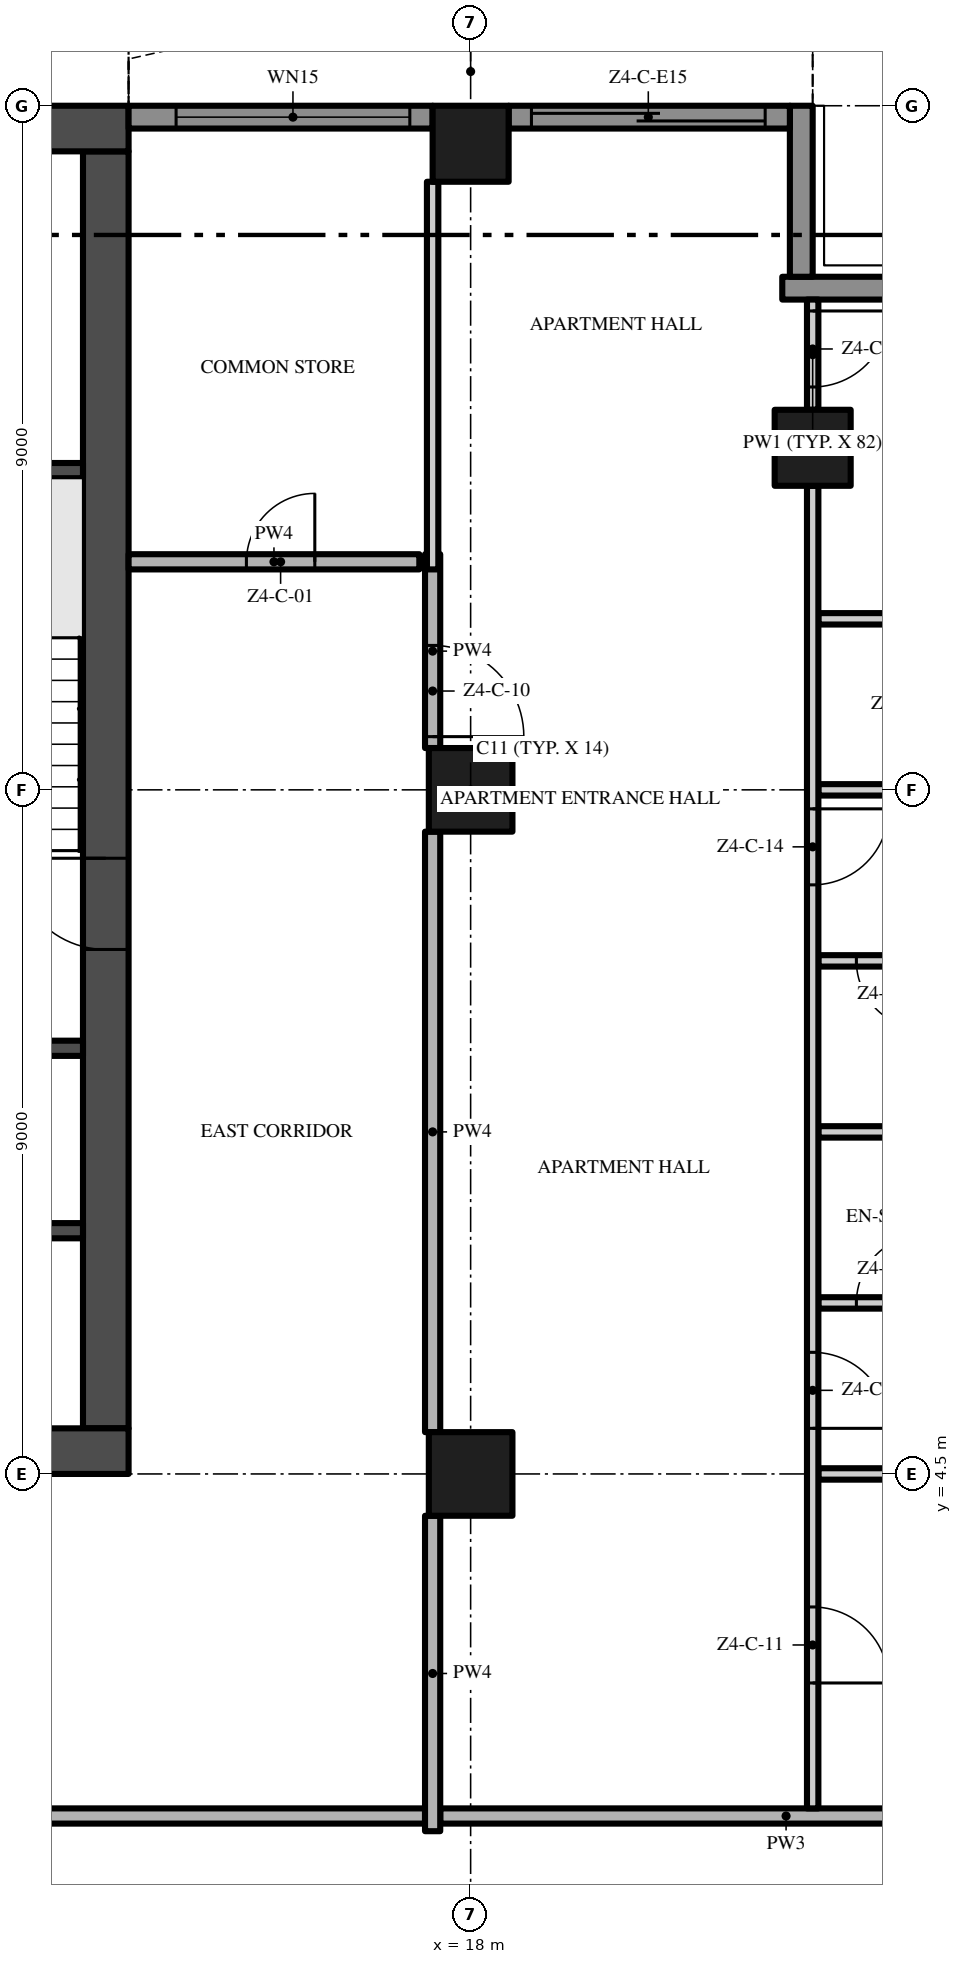
"""IFC4 building model, lengths in metres.
Left out: names, types, materials, properties, quantities, classifications, styles, units other than length and angle.
Written with IfcOpenShell. Run it as: python <this file> out.ifc"""

import sys

from ifc_helpers import new_model, si_unit, direction, frame, frame_2d, origin, origin_2d, place, context, subcontext, project, spatial, polyline, rectangle, outline, extrude, element, fill, save


model = new_model("IFC4")
c1 = context("Model", 3, precision=1e-05, world=origin(), true_north=direction((0.0, 1.0)))
c2 = subcontext(c1, "Body", "Model", "MODEL_VIEW")
j1 = project(units=[si_unit("LENGTHUNIT", "METRE"), si_unit("PLANEANGLEUNIT", "RADIAN")], contexts=[c1])
p1 = place(None, origin())
s1 = spatial("IfcSite", under=j1, at=p1, CompositionType="ELEMENT")
p2 = place(p1, origin())
s2 = spatial("IfcBuilding", under=s1, at=p2, CompositionType="ELEMENT")
p3 = place(p2, frame((0.0, 0.0, 214.8)))
s3 = spatial("IfcBuildingStorey", under=s2, at=p3, CompositionType="ELEMENT", Elevation=214.8)
p4 = place(p3, frame((-13.5, 4.8, -0.3), z_axis=(0.0, 0.0, 1.0), x_axis=(1.0, 0.0, 0.0)))
e1 = element("IfcWall", 1, at=p4, inside=s3, PredefinedType="SHEAR", context=c2, shape_type="SweptSolid", body=[
    extrude(rectangle(XDim=27.0, YDim=0.6, at=frame_2d((13.5, 0.0))), origin(), (0.0, 0.0, 1.0), 3.8),
])
p5 = place(p4, frame((12.0, 0.0, 0.3)))
e2 = element("IfcOpeningElement", 2, at=p5, cuts=e1, PredefinedType="OPENING", context=c2, shape_type="SweptSolid", body=[
    extrude(rectangle(XDim=3.0, YDim=2.4, at=frame_2d((1.5, 1.2))), frame((0.0, 0.31, 0.0), z_axis=(0.0, -1.0, 0.0), x_axis=(1.0, 0.0, 0.0)), (0.0, 0.0, 1.0), 0.62),
])
p6 = place(p4, frame((4.9, 0.0, 0.3)))
e3 = element("IfcOpeningElement", 3, at=p6, cuts=e1, PredefinedType="OPENING", context=c2, shape_type="SweptSolid", body=[
    extrude(rectangle(XDim=1.2, YDim=2.2, at=frame_2d((0.6, 1.1))), frame((0.0, 0.31, 0.0), z_axis=(0.0, -1.0, 0.0), x_axis=(1.0, 0.0, 0.0)), (0.0, 0.0, 1.0), 0.62),
])
p7 = place(p4, frame((20.75, 0.0, 0.3)))
e4 = element("IfcOpeningElement", 4, at=p7, cuts=e1, PredefinedType="OPENING", context=c2, shape_type="SweptSolid", body=[
    extrude(rectangle(XDim=1.5, YDim=2.2, at=frame_2d((0.75, 1.1))), frame((0.0, 0.31, 0.0), z_axis=(0.0, -1.0, 0.0), x_axis=(1.0, 0.0, 0.0)), (0.0, 0.0, 1.0), 0.62),
])
p8 = place(p4, frame((17.4, 0.0, 0.3)))
e5 = element("IfcOpeningElement", 5, at=p8, cuts=e1, PredefinedType="OPENING", context=c2, shape_type="SweptSolid", body=[
    extrude(rectangle(XDim=1.2, YDim=2.2, at=frame_2d((0.6, 1.1))), frame((0.0, 0.31, 0.0), z_axis=(0.0, -1.0, 0.0), x_axis=(1.0, 0.0, 0.0)), (0.0, 0.0, 1.0), 0.62),
])
p9 = place(p3, frame((13.2, 5.1, -0.3), z_axis=(0.0, 0.0, 1.0), x_axis=(0.0, 1.0, 0.0)))
e6 = element("IfcWall", 6, at=p9, inside=s3, PredefinedType="SHEAR", context=c2, shape_type="SweptSolid", body=[
    extrude(rectangle(XDim=16.8, YDim=0.6, at=frame_2d((8.4, 0.0))), origin(), (0.0, 0.0, 1.0), 3.8),
])
p10 = place(p9, frame((6.3, 0.0, 0.3)))
e7 = element("IfcOpeningElement", 7, at=p10, cuts=e6, PredefinedType="OPENING", context=c2, shape_type="SweptSolid", body=[
    extrude(rectangle(XDim=1.2, YDim=2.2, at=frame_2d((0.6, 1.1))), frame((0.0, 0.31, 0.0), z_axis=(0.0, -1.0, 0.0), x_axis=(1.0, 0.0, 0.0)), (0.0, 0.0, 1.0), 0.62),
])
p11 = place(p3, frame((13.5, 22.2, -0.3), z_axis=(0.0, 0.0, 1.0), x_axis=(-1.0, 0.0, 0.0)))
e8 = element("IfcWall", 8, at=p11, inside=s3, PredefinedType="SHEAR", context=c2, shape_type="SweptSolid", body=[
    extrude(rectangle(XDim=27.0, YDim=0.6, at=frame_2d((13.5, 0.0))), origin(), (0.0, 0.0, 1.0), 3.8),
])
p12 = place(p3, frame((18.0, 13.5, 0.0), z_axis=(0.0, 0.0, 1.0), x_axis=(1.0, 0.0, 0.0)))
e9 = element("IfcColumn", 9, at=p12, inside=s3, PredefinedType="COLUMN", context=c2, shape_type="SweptSolid", body=[
    extrude(rectangle(XDim=1.1, YDim=1.1, at=origin_2d()), origin(), (0.0, 0.0, 1.0), 3.5),
])
p13 = place(p3, frame((18.0, 22.0, 0.0), z_axis=(0.0, 0.0, 1.0), x_axis=(1.0, 0.0, 0.0)))
e10 = element("IfcColumn", 10, at=p13, inside=s3, PredefinedType="COLUMN", context=c2, shape_type="SweptSolid", body=[
    extrude(rectangle(XDim=1.0, YDim=1.0, at=origin_2d()), origin(), (0.0, 0.0, 1.0), 3.5),
])
p14 = place(p3, frame((18.0, 4.5, 0.0), z_axis=(0.0, 0.0, 1.0), x_axis=(1.0, 0.0, 0.0)))
e11 = element("IfcColumn", 11, at=p14, inside=s3, PredefinedType="COLUMN", context=c2, shape_type="SweptSolid", body=[
    extrude(rectangle(XDim=1.1, YDim=1.1, at=origin_2d()), origin(), (0.0, 0.0, 1.0), 3.5),
])
p15 = place(p3, frame((22.5, 18.0, 0.0), z_axis=(0.0, 0.0, 1.0), x_axis=(1.0, 0.0, 0.0)))
e12 = element("IfcColumn", 12, at=p15, inside=s3, PredefinedType="COLUMN", context=c2, shape_type="SweptSolid", body=[
    extrude(rectangle(XDim=1.0, YDim=1.0, at=origin_2d()), origin(), (0.0, 0.0, 1.0), 3.5),
])
p16 = place(p3, frame((22.1, 20.1, 0.0), z_axis=(0.0, 0.0, 1.0), x_axis=(1.0, 0.0, 0.0)))
e13 = element("IfcWall", 13, at=p16, inside=s3, PredefinedType="SOLIDWALL", context=c2, shape_type="SweptSolid", body=[
    extrude(rectangle(XDim=2.35, YDim=0.3, at=frame_2d((1.175, 0.0))), origin(), (0.0, 0.0, 1.0), 3.5),
])
p17 = place(p3, frame((22.35, 22.5, 0.0), z_axis=(0.0, 0.0, 1.0), x_axis=(0.0, -1.0, 0.0)))
e14 = element("IfcWall", 14, at=p17, inside=s3, PredefinedType="SOLIDWALL", context=c2, shape_type="SweptSolid", body=[
    extrude(rectangle(XDim=2.25, YDim=0.3, at=frame_2d((1.125, 0.0))), origin(), (0.0, 0.0, 1.0), 3.5),
])
p18 = place(p3, frame((18.5, 22.35, 0.0), z_axis=(0.0, 0.0, 1.0), x_axis=(1.0, 0.0, 0.0)))
e15 = element("IfcWall", 15, at=p18, inside=s3, PredefinedType="SOLIDWALL", context=c2, shape_type="SweptSolid", body=[
    extrude(rectangle(XDim=3.7, YDim=0.3, at=frame_2d((1.85, 0.0))), origin(), (0.0, 0.0, 1.0), 3.5),
])
p19 = place(p18, frame((0.3, 0.0, 0.0)))
e16 = element("IfcOpeningElement", 16, at=p19, cuts=e15, PredefinedType="OPENING", context=c2, shape_type="SweptSolid", body=[
    extrude(rectangle(XDim=3.075, YDim=2.4, at=frame_2d((1.538, 1.2))), frame((0.0, 0.16, 0.0), z_axis=(0.0, -1.0, 0.0), x_axis=(1.0, 0.0, 0.0)), (0.0, 0.0, 1.0), 0.32),
])
p20 = place(p3, frame((13.5, 22.35, 0.0), z_axis=(0.0, 0.0, 1.0), x_axis=(1.0, 0.0, 0.0)))
e17 = element("IfcWall", 17, at=p20, inside=s3, PredefinedType="SOLIDWALL", context=c2, shape_type="SweptSolid", body=[
    extrude(rectangle(XDim=4.0, YDim=0.3, at=frame_2d((2.0, 0.0))), origin(), (0.0, 0.0, 1.0), 3.5),
])
p21 = place(p20, frame((0.625, 0.0, 0.45)))
e18 = element("IfcOpeningElement", 18, at=p21, cuts=e17, PredefinedType="OPENING", context=c2, shape_type="SweptSolid", body=[
    extrude(rectangle(XDim=3.075, YDim=2.65, at=frame_2d((1.538, 1.325))), frame((0.0, 0.16, 0.0), z_axis=(0.0, -1.0, 0.0), x_axis=(1.0, 0.0, 0.0)), (0.0, 0.0, 1.0), 0.32),
])
p22 = place(p3, origin())
e19 = element("IfcWall", 19, at=p22, inside=s3, PredefinedType="USERDEFINED", context=c2, shape_type="SweptSolid", body=[
    extrude(outline(polyline([(22.5, 25.149), (21.0, 25.485), (20.625, 25.5), (19.5, 25.369), (18.0, 24.845), (16.5, 24.112), (15.0, 23.451), (13.5, 23.115), (13.555, 22.871), (15.079, 23.213), (16.605, 23.885), (18.096, 24.614), (19.556, 25.124), (20.635, 25.249), (20.967, 25.236), (22.445, 24.905), (22.5, 25.149)])), origin(), (0.0, 0.0, 1.0), 0.9),
])
for number, where, z_axis, x_axis in (
    (20, (9.65, 7.7, 0.0), (0.0, 0.0, 1.0), (1.0, 0.0, 0.0)),
    (21, (9.65, 10.1, 0.0), (0.0, 0.0, 1.0), (1.0, 0.0, 0.0)),
    (22, (9.65, 17.7, 0.0), (0.0, 0.0, 1.0), (1.0, 0.0, 0.0)),
):
    element("IfcWall", number, at=place(p3, frame(where, z_axis=z_axis, x_axis=x_axis)), inside=s3, PredefinedType="SHEAR", context=c2, shape_type="SweptSolid", body=[
        extrude(rectangle(XDim=3.25, YDim=0.2, at=frame_2d((1.625, 0.0))), origin(), (0.0, 0.0, 1.0), 3.5),
    ])
p23 = place(p3, frame((17.4, 0.0, 0.0), z_axis=(0.0, 0.0, 1.0), x_axis=(-1.0, 0.0, 0.0)))
e23 = element("IfcWall", 23, at=p23, inside=s3, PredefinedType="PARTITIONING", context=c2, shape_type="SweptSolid", body=[
    extrude(rectangle(XDim=17.3, YDim=0.2, at=frame_2d((8.65, 0.0))), origin(), (0.0, 0.0, 1.0), 3.5),
])
p24 = place(p23, frame((7.65, 0.0, 0.0)))
e24 = element("IfcOpeningElement", 24, at=p24, cuts=e23, PredefinedType="OPENING", context=c2, shape_type="SweptSolid", body=[
    extrude(rectangle(XDim=1.5, YDim=2.4, at=frame_2d((0.75, 1.2))), frame((0.0, 0.11, 0.0), z_axis=(0.0, -1.0, 0.0), x_axis=(1.0, 0.0, 0.0)), (0.0, 0.0, 1.0), 0.22),
])
p25 = place(p3, frame((17.6, 0.0, 0.0), z_axis=(0.0, 0.0, 1.0), x_axis=(1.0, 0.0, 0.0)))
e25 = element("IfcWall", 25, at=p25, inside=s3, PredefinedType="PARTITIONING", context=c2, shape_type="SweptSolid", body=[
    extrude(rectangle(XDim=9.1, YDim=0.2, at=frame_2d((4.55, 0.0))), origin(), (0.0, 0.0, 1.0), 3.5),
])
p26 = place(p3, frame((22.575, 4.5, 0.0), z_axis=(0.0, 0.0, 1.0), x_axis=(1.0, 0.0, 0.0)))
e26 = element("IfcWall", 26, at=p26, inside=s3, PredefinedType="PARTITIONING", context=c2, shape_type="SweptSolid", body=[
    extrude(rectangle(XDim=3.425, YDim=0.15, at=frame_2d((1.712, 0.0))), origin(), (0.0, 0.0, 1.0), 3.5),
])
p27 = place(p3, frame((22.575, 6.75, 0.0), z_axis=(0.0, 0.0, 1.0), x_axis=(1.0, 0.0, 0.0)))
e27 = element("IfcWall", 27, at=p27, inside=s3, PredefinedType="PARTITIONING", context=c2, shape_type="SweptSolid", body=[
    extrude(rectangle(XDim=1.875, YDim=0.15, at=frame_2d((0.938, 0.0))), origin(), (0.0, 0.0, 1.0), 3.5),
])
p28 = place(p27, frame((0.5, 0.0, 0.0)))
e28 = element("IfcOpeningElement", 28, at=p28, cuts=e27, PredefinedType="OPENING", context=c2, shape_type="SweptSolid", body=[
    extrude(rectangle(XDim=0.9, YDim=2.1, at=frame_2d((0.45, 1.05))), frame((0.0, 0.085, 0.0), z_axis=(0.0, -1.0, 0.0), x_axis=(1.0, 0.0, 0.0)), (0.0, 0.0, 1.0), 0.17),
])
p29 = place(p3, frame((22.575, 9.0, 0.0), z_axis=(0.0, 0.0, 1.0), x_axis=(1.0, 0.0, 0.0)))
e29 = element("IfcWall", 29, at=p29, inside=s3, PredefinedType="PARTITIONING", context=c2, shape_type="SweptSolid", body=[
    extrude(rectangle(XDim=1.875, YDim=0.15, at=frame_2d((0.938, 0.0))), origin(), (0.0, 0.0, 1.0), 3.5),
])
p30 = place(p3, frame((24.45, 11.25, 0.0), z_axis=(0.0, 0.0, 1.0), x_axis=(-1.0, 0.0, 0.0)))
e30 = element("IfcWall", 30, at=p30, inside=s3, PredefinedType="PARTITIONING", context=c2, shape_type="SweptSolid", body=[
    extrude(rectangle(XDim=1.875, YDim=0.15, at=frame_2d((0.938, 0.0))), origin(), (0.0, 0.0, 1.0), 3.5),
])
p31 = place(p30, frame((0.475, 0.0, 0.0)))
e31 = element("IfcOpeningElement", 31, at=p31, cuts=e30, PredefinedType="OPENING", context=c2, shape_type="SweptSolid", body=[
    extrude(rectangle(XDim=0.9, YDim=2.1, at=frame_2d((0.45, 1.05))), frame((0.0, 0.085, 0.0), z_axis=(0.0, -1.0, 0.0), x_axis=(1.0, 0.0, 0.0)), (0.0, 0.0, 1.0), 0.17),
])
p32 = place(p3, frame((22.575, 13.5, 0.0), z_axis=(0.0, 0.0, 1.0), x_axis=(1.0, 0.0, 0.0)))
e32 = element("IfcWall", 32, at=p32, inside=s3, PredefinedType="PARTITIONING", context=c2, shape_type="SweptSolid", body=[
    extrude(rectangle(XDim=3.425, YDim=0.15, at=frame_2d((1.712, 0.0))), origin(), (0.0, 0.0, 1.0), 3.5),
])
p33 = place(p3, frame((22.575, 15.75, 0.0), z_axis=(0.0, 0.0, 1.0), x_axis=(1.0, 0.0, 0.0)))
e33 = element("IfcWall", 33, at=p33, inside=s3, PredefinedType="PARTITIONING", context=c2, shape_type="SweptSolid", body=[
    extrude(rectangle(XDim=1.875, YDim=0.15, at=frame_2d((0.938, 0.0))), origin(), (0.0, 0.0, 1.0), 3.5),
])
p34 = place(p3, frame((13.5, 16.5, 0.0), z_axis=(0.0, 0.0, 1.0), x_axis=(1.0, 0.0, 0.0)))
e34 = element("IfcWall", 34, at=p34, inside=s3, PredefinedType="PARTITIONING", context=c2, shape_type="SweptSolid", body=[
    extrude(rectangle(XDim=3.825, YDim=0.2, at=frame_2d((1.913, 0.0))), origin(), (0.0, 0.0, 1.0), 3.5),
])
p35 = place(p34, frame((1.55, 0.0, 0.0)))
e35 = element("IfcOpeningElement", 35, at=p35, cuts=e34, PredefinedType="OPENING", context=c2, shape_type="SweptSolid", body=[
    extrude(rectangle(XDim=0.9, YDim=2.1, at=frame_2d((0.45, 1.05))), frame((0.0, 0.11, 0.0), z_axis=(0.0, -1.0, 0.0), x_axis=(1.0, 0.0, 0.0)), (0.0, 0.0, 1.0), 0.22),
])
p36 = place(p3, frame((17.5, -0.2, 0.0), z_axis=(0.0, 0.0, 1.0), x_axis=(0.0, 1.0, 0.0)))
e36 = element("IfcWall", 36, at=p36, inside=s3, PredefinedType="PARTITIONING", context=c2, shape_type="SweptSolid", body=[
    extrude(rectangle(XDim=4.15, YDim=0.2, at=frame_2d((2.075, 0.0))), origin(), (0.0, 0.0, 1.0), 3.5),
])
p37 = place(p3, frame((17.5, 5.05, 0.0), z_axis=(0.0, 0.0, 1.0), x_axis=(0.0, 1.0, 0.0)))
e37 = element("IfcWall", 37, at=p37, inside=s3, PredefinedType="PARTITIONING", context=c2, shape_type="SweptSolid", body=[
    extrude(rectangle(XDim=7.9, YDim=0.2, at=frame_2d((3.95, 0.0))), origin(), (0.0, 0.0, 1.0), 3.5),
])
p38 = place(p3, frame((17.5, 16.6, 0.0), z_axis=(0.0, 0.0, 1.0), x_axis=(0.0, -1.0, 0.0)))
e38 = element("IfcWall", 38, at=p38, inside=s3, PredefinedType="PARTITIONING", context=c2, shape_type="SweptSolid", body=[
    extrude(rectangle(XDim=2.55, YDim=0.2, at=frame_2d((1.275, 0.0))), origin(), (0.0, 0.0, 1.0), 3.5),
])
p39 = place(p38, frame((1.2, 0.0, 0.0)))
e39 = element("IfcOpeningElement", 39, at=p39, cuts=e38, PredefinedType="OPENING", context=c2, shape_type="SweptSolid", body=[
    extrude(rectangle(XDim=1.2, YDim=2.4, at=frame_2d((0.6, 1.2))), frame((0.0, 0.11, 0.0), z_axis=(0.0, -1.0, 0.0), x_axis=(1.0, 0.0, 0.0)), (0.0, 0.0, 1.0), 0.22),
])
p40 = place(p3, frame((17.5, 16.4, 0.0), z_axis=(0.0, 0.0, 1.0), x_axis=(0.0, 1.0, 0.0)))
e40 = element("IfcWall", 40, at=p40, inside=s3, PredefinedType="PARTITIONING", context=c2, shape_type="SweptSolid", body=[
    extrude(rectangle(XDim=5.1, YDim=0.15, at=frame_2d((2.55, 0.0))), origin(), (0.0, 0.0, 1.0), 3.5),
])
p41 = place(p3, frame((22.5, 17.5, 0.0), z_axis=(0.0, 0.0, 1.0), x_axis=(0.0, -1.0, 0.0)))
e41 = element("IfcWall", 41, at=p41, inside=s3, PredefinedType="PARTITIONING", context=c2, shape_type="SweptSolid", body=[
    extrude(rectangle(XDim=17.4, YDim=0.15, at=frame_2d((8.7, 0.0))), origin(), (0.0, 0.0, 1.0), 3.5),
])
p42 = place(p41, frame((14.75, 0.0, 0.0)))
e42 = element("IfcOpeningElement", 42, at=p42, cuts=e41, PredefinedType="OPENING", context=c2, shape_type="SweptSolid", body=[
    extrude(rectangle(XDim=1.0, YDim=2.4, at=frame_2d((0.5, 1.2))), frame((0.0, 0.085, 0.0), z_axis=(0.0, -1.0, 0.0), x_axis=(1.0, 0.0, 0.0)), (0.0, 0.0, 1.0), 0.17),
])
p43 = place(p41, frame((11.4, 0.0, 0.0)))
e43 = element("IfcOpeningElement", 43, at=p43, cuts=e41, PredefinedType="OPENING", context=c2, shape_type="SweptSolid", body=[
    extrude(rectangle(XDim=1.0, YDim=2.4, at=frame_2d((0.5, 1.2))), frame((0.0, 0.085, 0.0), z_axis=(0.0, -1.0, 0.0), x_axis=(1.0, 0.0, 0.0)), (0.0, 0.0, 1.0), 0.17),
])
p44 = place(p41, frame((4.25, 0.0, 0.0)))
e44 = element("IfcOpeningElement", 44, at=p44, cuts=e41, PredefinedType="OPENING", context=c2, shape_type="SweptSolid", body=[
    extrude(rectangle(XDim=1.0, YDim=2.4, at=frame_2d((0.5, 1.2))), frame((0.0, 0.085, 0.0), z_axis=(0.0, -1.0, 0.0), x_axis=(1.0, 0.0, 0.0)), (0.0, 0.0, 1.0), 0.17),
])
p45 = place(p3, frame((22.5, 19.95, 0.0), z_axis=(0.0, 0.0, 1.0), x_axis=(0.0, -1.0, 0.0)))
e45 = element("IfcWall", 45, at=p45, inside=s3, PredefinedType="PARTITIONING", context=c2, shape_type="SweptSolid", body=[
    extrude(rectangle(XDim=1.45, YDim=0.15, at=frame_2d((0.725, 0.0))), origin(), (0.0, 0.0, 1.0), 3.5),
])
p46 = place(p45, frame((0.15, 0.0, 0.0)))
e46 = element("IfcOpeningElement", 46, at=p46, cuts=e45, PredefinedType="OPENING", context=c2, shape_type="SweptSolid", body=[
    extrude(rectangle(XDim=1.0, YDim=2.4, at=frame_2d((0.5, 1.2))), frame((0.0, 0.085, 0.0), z_axis=(0.0, -1.0, 0.0), x_axis=(1.0, 0.0, 0.0)), (0.0, 0.0, 1.0), 0.17),
])
p47 = place(p19, origin())
e47 = element("IfcDoor", 47, at=p47, inside=s3, OperationType="SINGLE_SWING_LEFT", PredefinedType="DOOR", context=c2, shape_type="SweptSolid", body=[
    extrude(rectangle(XDim=3.075, YDim=2.4, at=frame_2d((1.538, 1.2))), frame((0.0, 0.025, 0.0), z_axis=(0.0, -1.0, 0.0), x_axis=(1.0, 0.0, 0.0)), (0.0, 0.0, 1.0), 0.05),
])
fill(e16, e47)
p48 = place(p21, origin())
e48 = element("IfcWindow", 48, at=p48, inside=s3, PartitioningType="SINGLE_PANEL", PredefinedType="WINDOW", context=c2, shape_type="SweptSolid", body=[
    extrude(rectangle(XDim=3.075, YDim=2.65, at=frame_2d((1.538, 1.325))), frame((0.0, 0.03, 0.0), z_axis=(0.0, -1.0, 0.0), x_axis=(1.0, 0.0, 0.0)), (0.0, 0.0, 1.0), 0.06),
])
fill(e18, e48)
p49 = place(p10, frame((1.2, 0.0, 0.0), z_axis=(0.0, 0.0, 1.0), x_axis=(-1.0, 0.0, 0.0)))
e49 = element("IfcDoor", 49, at=p49, inside=s3, OperationType="SINGLE_SWING_LEFT", PredefinedType="DOOR", context=c2, shape_type="SweptSolid", body=[
    extrude(rectangle(XDim=1.2, YDim=2.2, at=frame_2d((0.6, 1.1))), frame((0.0, 0.025, 0.0), z_axis=(0.0, -1.0, 0.0), x_axis=(1.0, 0.0, 0.0)), (0.0, 0.0, 1.0), 0.05),
])
fill(e7, e49)
p50 = place(p35, origin())
e50 = element("IfcDoor", 50, at=p50, inside=s3, OperationType="SINGLE_SWING_RIGHT", PredefinedType="DOOR", context=c2, shape_type="SweptSolid", body=[
    extrude(rectangle(XDim=0.9, YDim=2.1, at=frame_2d((0.45, 1.05))), frame((0.0, 0.025, 0.0), z_axis=(0.0, -1.0, 0.0), x_axis=(1.0, 0.0, 0.0)), (0.0, 0.0, 1.0), 0.05),
])
fill(e35, e50)
p51 = place(p39, origin())
e51 = element("IfcDoor", 51, at=p51, inside=s3, OperationType="SINGLE_SWING_RIGHT", PredefinedType="DOOR", context=c2, shape_type="SweptSolid", body=[
    extrude(rectangle(XDim=1.2, YDim=2.4, at=frame_2d((0.6, 1.2))), frame((0.0, 0.025, 0.0), z_axis=(0.0, -1.0, 0.0), x_axis=(1.0, 0.0, 0.0)), (0.0, 0.0, 1.0), 0.05),
])
fill(e39, e51)
p52 = place(p42, origin())
e52 = element("IfcDoor", 52, at=p52, inside=s3, OperationType="SINGLE_SWING_RIGHT", PredefinedType="DOOR", context=c2, shape_type="SweptSolid", body=[
    extrude(rectangle(XDim=1.0, YDim=2.4, at=frame_2d((0.5, 1.2))), frame((0.0, 0.025, 0.0), z_axis=(0.0, -1.0, 0.0), x_axis=(1.0, 0.0, 0.0)), (0.0, 0.0, 1.0), 0.05),
])
fill(e42, e52)
p53 = place(p43, origin())
e53 = element("IfcDoor", 53, at=p53, inside=s3, OperationType="SINGLE_SWING_RIGHT", PredefinedType="DOOR", context=c2, shape_type="SweptSolid", body=[
    extrude(rectangle(XDim=1.0, YDim=2.4, at=frame_2d((0.5, 1.2))), frame((0.0, 0.025, 0.0), z_axis=(0.0, -1.0, 0.0), x_axis=(1.0, 0.0, 0.0)), (0.0, 0.0, 1.0), 0.05),
])
fill(e43, e53)
p54 = place(p28, origin())
e54 = element("IfcDoor", 54, at=p54, inside=s3, OperationType="SINGLE_SWING_RIGHT", PredefinedType="DOOR", context=c2, shape_type="SweptSolid", body=[
    extrude(rectangle(XDim=0.9, YDim=2.1, at=frame_2d((0.45, 1.05))), frame((0.0, 0.025, 0.0), z_axis=(0.0, -1.0, 0.0), x_axis=(1.0, 0.0, 0.0)), (0.0, 0.0, 1.0), 0.05),
])
fill(e28, e54)
p55 = place(p44, origin())
e55 = element("IfcDoor", 55, at=p55, inside=s3, OperationType="SINGLE_SWING_LEFT", PredefinedType="DOOR", context=c2, shape_type="SweptSolid", body=[
    extrude(rectangle(XDim=1.0, YDim=2.4, at=frame_2d((0.5, 1.2))), frame((0.0, 0.025, 0.0), z_axis=(0.0, -1.0, 0.0), x_axis=(1.0, 0.0, 0.0)), (0.0, 0.0, 1.0), 0.05),
])
fill(e44, e55)
p56 = place(p31, origin())
e56 = element("IfcDoor", 56, at=p56, inside=s3, OperationType="SINGLE_SWING_LEFT", PredefinedType="DOOR", context=c2, shape_type="SweptSolid", body=[
    extrude(rectangle(XDim=0.9, YDim=2.1, at=frame_2d((0.45, 1.05))), frame((0.0, 0.025, 0.0), z_axis=(0.0, -1.0, 0.0), x_axis=(1.0, 0.0, 0.0)), (0.0, 0.0, 1.0), 0.05),
])
fill(e31, e56)
p57 = place(p46, origin())
e57 = element("IfcDoor", 57, at=p57, inside=s3, OperationType="SINGLE_SWING_LEFT", PredefinedType="DOOR", context=c2, shape_type="SweptSolid", body=[
    extrude(rectangle(XDim=1.0, YDim=2.4, at=frame_2d((0.5, 1.2))), frame((0.0, 0.025, 0.0), z_axis=(0.0, -1.0, 0.0), x_axis=(1.0, 0.0, 0.0)), (0.0, 0.0, 1.0), 0.05),
])
fill(e46, e57)
save(model, sys.argv[1])
